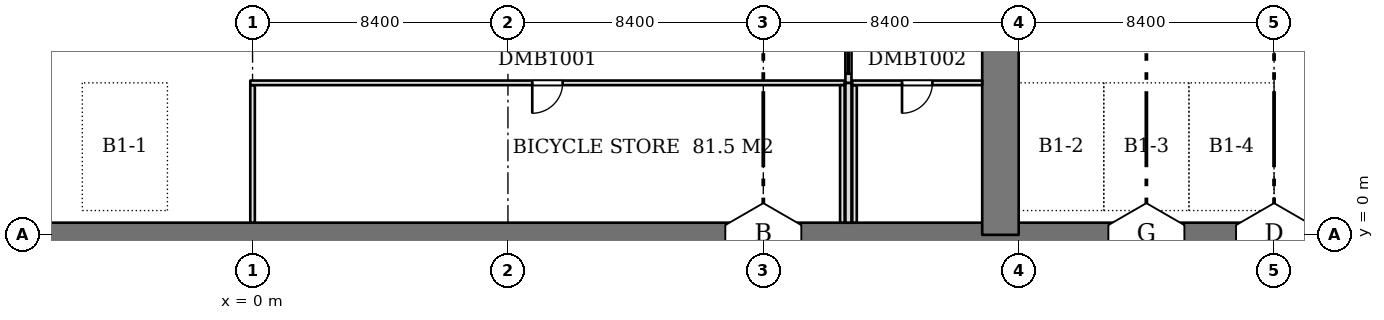
"""IFC4 building model, lengths in metres.
Left out: names, types, materials, properties, quantities, classifications, styles, units other than length and angle.
Written with IfcOpenShell. Run it as: python <this file> out.ifc"""

import sys

from ifc_helpers import new_model, si_unit, direction, frame, frame_2d, origin, place, context, subcontext, project, spatial, rectangle, extrude, element, fill, save


model = new_model("IFC4")
c1 = context("Model", 3, precision=1e-05, world=origin(), true_north=direction((0.0, 1.0)))
c2 = subcontext(c1, "Body", "Model", "MODEL_VIEW")
j1 = project(units=[si_unit("LENGTHUNIT", "METRE"), si_unit("PLANEANGLEUNIT", "RADIAN")], contexts=[c1])
p1 = place(None, origin())
s1 = spatial("IfcSite", under=j1, at=p1, CompositionType="ELEMENT")
p2 = place(p1, origin())
s2 = spatial("IfcBuilding", under=s1, at=p2, CompositionType="ELEMENT")
p3 = place(p2, frame((0.0, 0.0, -4.0)))
s3 = spatial("IfcBuildingStorey", under=s2, at=p3, CompositionType="ELEMENT", Elevation=-4.0)
p4 = place(p3, frame((-8.8, 0.0, 0.0), z_axis=(0.0, 0.0, 1.0), x_axis=(1.0, 0.0, 0.0)))
e1 = element("IfcWall", 1, at=p4, inside=s3, PredefinedType="SOLIDWALL", context=c2, shape_type="SweptSolid", body=[
    extrude(rectangle(XDim=76.0, YDim=0.8, at=frame_2d((38.0, 0.0))), origin(), (0.0, 0.0, 1.0), 3.6),
])
p5 = place(p3, frame((24.6, 0.0, 0.0), z_axis=(0.0, 0.0, 1.0), x_axis=(0.0, 1.0, 0.0)))
e2 = element("IfcWall", 2, at=p5, inside=s3, PredefinedType="SHEAR", context=c2, shape_type="SweptSolid", body=[
    extrude(rectangle(XDim=25.2, YDim=1.2, at=frame_2d((12.6, 0.0))), origin(), (0.0, 0.0, 1.0), 3.6),
])
p6 = place(p3, frame((0.0, 0.4, 0.0), z_axis=(0.0, 0.0, 1.0), x_axis=(0.0, 1.0, 0.0)))
e3 = element("IfcWall", 3, at=p6, inside=s3, PredefinedType="PARTITIONING", context=c2, shape_type="SweptSolid", body=[
    extrude(rectangle(XDim=4.525, YDim=0.15, at=frame_2d((2.263, 0.0))), origin(), (0.0, 0.0, 1.0), 3.6),
])
p7 = place(p3, frame((-0.075, 5.0, 0.0), z_axis=(0.0, 0.0, 1.0), x_axis=(1.0, 0.0, 0.0)))
e4 = element("IfcWall", 4, at=p7, inside=s3, PredefinedType="PARTITIONING", context=c2, shape_type="SweptSolid", body=[
    extrude(rectangle(XDim=19.55, YDim=0.15, at=frame_2d((9.775, 0.0))), origin(), (0.0, 0.0, 1.0), 3.6),
])
p8 = place(p7, frame((9.275, 0.0, 0.0)))
e5 = element("IfcOpeningElement", 5, at=p8, cuts=e4, PredefinedType="OPENING", context=c2, shape_type="SweptSolid", body=[
    extrude(rectangle(XDim=1.0, YDim=2.1, at=frame_2d((0.5, 1.05))), frame((0.0, 0.085, 0.0), z_axis=(0.0, -1.0, 0.0), x_axis=(1.0, 0.0, 0.0)), (0.0, 0.0, 1.0), 0.17),
])
for number, where, z_axis, x_axis in (
    (6, (19.4, 0.4, 0.0), (0.0, 0.0, 1.0), (0.0, 1.0, 0.0)),
    (7, (19.8, 0.4, 0.0), (0.0, 0.0, 1.0), (0.0, 1.0, 0.0)),
):
    element("IfcWall", number, at=place(p3, frame(where, z_axis=z_axis, x_axis=x_axis)), inside=s3, PredefinedType="PARTITIONING", context=c2, shape_type="SweptSolid", body=[
        extrude(rectangle(XDim=4.525, YDim=0.15, at=frame_2d((2.263, 0.0))), origin(), (0.0, 0.0, 1.0), 3.6),
    ])
p9 = place(p3, frame((19.725, 5.0, 0.0), z_axis=(0.0, 0.0, 1.0), x_axis=(1.0, 0.0, 0.0)))
e8 = element("IfcWall", 8, at=p9, inside=s3, PredefinedType="PARTITIONING", context=c2, shape_type="SweptSolid", body=[
    extrude(rectangle(XDim=4.275, YDim=0.15, at=frame_2d((2.137, 0.0))), origin(), (0.0, 0.0, 1.0), 3.6),
])
p10 = place(p9, frame((1.637, 0.0, 0.0)))
e9 = element("IfcOpeningElement", 9, at=p10, cuts=e8, PredefinedType="OPENING", context=c2, shape_type="SweptSolid", body=[
    extrude(rectangle(XDim=1.0, YDim=2.1, at=frame_2d((0.5, 1.05))), frame((0.0, 0.085, 0.0), z_axis=(0.0, -1.0, 0.0), x_axis=(1.0, 0.0, 0.0)), (0.0, 0.0, 1.0), 0.17),
])
p11 = place(p3, frame((19.6, 0.4, 0.0), z_axis=(0.0, 0.0, 1.0), x_axis=(0.0, 1.0, 0.0)))
e10 = element("IfcWall", 10, at=p11, inside=s3, PredefinedType="PARTITIONING", context=c2, shape_type="SweptSolid", body=[
    extrude(rectangle(XDim=4.6, YDim=0.2, at=frame_2d((2.3, 0.0))), origin(), (0.0, 0.0, 1.0), 3.6),
])
p12 = place(p3, frame((19.6, 5.0, 0.0), z_axis=(0.0, 0.0, 1.0), x_axis=(0.0, 1.0, 0.0)))
e11 = element("IfcWall", 11, at=p12, inside=s3, PredefinedType="PARTITIONING", context=c2, shape_type="SweptSolid", body=[
    extrude(rectangle(XDim=6.8, YDim=0.2, at=frame_2d((3.4, 0.0))), origin(), (0.0, 0.0, 1.0), 3.6),
])
p13 = place(p12, frame((0.3, 0.0, 0.0)))
e12 = element("IfcOpeningElement", 12, at=p13, cuts=e11, PredefinedType="OPENING", context=c2, shape_type="SweptSolid", body=[
    extrude(rectangle(XDim=4.8, YDim=2.4, at=frame_2d((2.4, 1.2))), frame((0.0, 0.11, 0.0), z_axis=(0.0, -1.0, 0.0), x_axis=(1.0, 0.0, 0.0)), (0.0, 0.0, 1.0), 0.22),
])
p14 = place(p12, frame((5.4, 0.0, 0.0)))
e13 = element("IfcOpeningElement", 13, at=p14, cuts=e11, PredefinedType="OPENING", context=c2, shape_type="SweptSolid", body=[
    extrude(rectangle(XDim=1.0, YDim=2.1, at=frame_2d((0.5, 1.05))), frame((0.0, 0.11, 0.0), z_axis=(0.0, -1.0, 0.0), x_axis=(1.0, 0.0, 0.0)), (0.0, 0.0, 1.0), 0.22),
])
p15 = place(p8, frame((1.0, 0.0, 0.0), z_axis=(0.0, 0.0, 1.0), x_axis=(-1.0, 0.0, 0.0)))
e14 = element("IfcDoor", 14, at=p15, inside=s3, OperationType="SINGLE_SWING_RIGHT", PredefinedType="DOOR", context=c2, shape_type="SweptSolid", body=[
    extrude(rectangle(XDim=1.0, YDim=2.1, at=frame_2d((0.5, 1.05))), frame((0.0, 0.025, 0.0), z_axis=(0.0, -1.0, 0.0), x_axis=(1.0, 0.0, 0.0)), (0.0, 0.0, 1.0), 0.05),
])
fill(e5, e14)
p16 = place(p10, frame((1.0, 0.0, 0.0), z_axis=(0.0, 0.0, 1.0), x_axis=(-1.0, 0.0, 0.0)))
e15 = element("IfcDoor", 15, at=p16, inside=s3, OperationType="SINGLE_SWING_RIGHT", PredefinedType="DOOR", context=c2, shape_type="SweptSolid", body=[
    extrude(rectangle(XDim=1.0, YDim=2.1, at=frame_2d((0.5, 1.05))), frame((0.0, 0.025, 0.0), z_axis=(0.0, -1.0, 0.0), x_axis=(1.0, 0.0, 0.0)), (0.0, 0.0, 1.0), 0.05),
])
fill(e9, e15)
p17 = place(p13, origin())
e16 = element("IfcDoor", 16, at=p17, inside=s3, OperationType="ROLLINGUP", PredefinedType="GATE", context=c2, shape_type="SweptSolid", body=[
    extrude(rectangle(XDim=4.8, YDim=2.4, at=frame_2d((2.4, 1.2))), frame((0.0, 0.025, 0.0), z_axis=(0.0, -1.0, 0.0), x_axis=(1.0, 0.0, 0.0)), (0.0, 0.0, 1.0), 0.05),
])
fill(e12, e16)
save(model, sys.argv[1])
